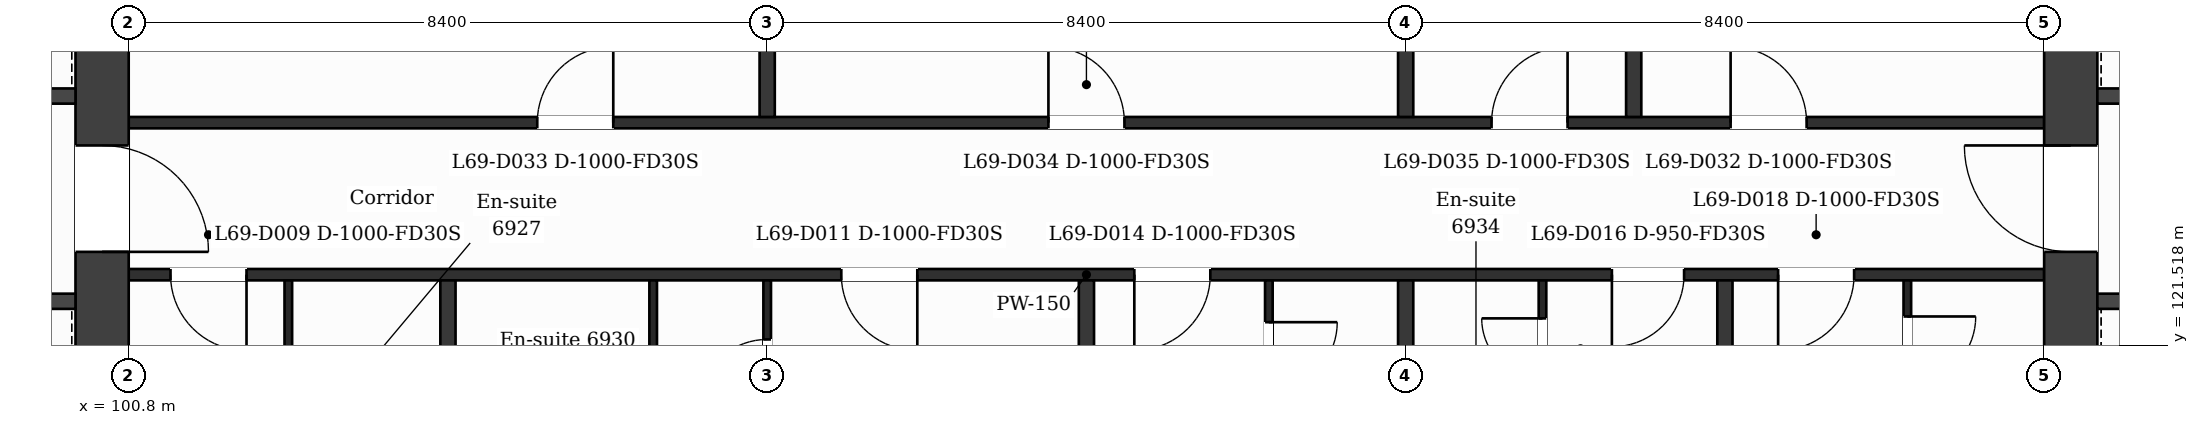
"""IFC4 building model, lengths in metres.
Left out: names, types, materials, properties, quantities, classifications, styles, units other than length and angle.
Written with IfcOpenShell. Run it as: python <this file> out.ifc"""

import sys

from ifc_helpers import new_model, si_unit, direction, frame, frame_2d, origin, place, context, subcontext, project, spatial, rectangle, extrude, element, fill, save


model = new_model("IFC4")
c1 = context("Model", 3, precision=1e-05, world=origin(), true_north=direction((0.0, 1.0)))
c2 = subcontext(c1, "Body", "Model", "MODEL_VIEW")
j1 = project(units=[si_unit("LENGTHUNIT", "METRE"), si_unit("PLANEANGLEUNIT", "RADIAN")], contexts=[c1])
p1 = place(None, origin())
s1 = spatial("IfcSite", under=j1, at=p1, CompositionType="ELEMENT")
p2 = place(p1, origin())
s2 = spatial("IfcBuilding", under=s1, at=p2, CompositionType="ELEMENT")
p3 = place(p2, frame((0.0, 0.0, 284.9)))
s3 = spatial("IfcBuildingStorey", under=s2, at=p3, CompositionType="ELEMENT", Elevation=284.9)
p4 = place(p3, frame((100.45, 132.05, 0.0), z_axis=(0.0, 0.0, 1.0), x_axis=(0.0, -1.0, 0.0)))
e1 = element("IfcWall", 1, at=p4, inside=s3, PredefinedType="SHEAR", context=c2, shape_type="SweptSolid", body=[
    extrude(rectangle(XDim=15.7, YDim=0.7, at=frame_2d((7.85, 0.0))), origin(), (0.0, 0.0, 1.0), 3.7),
])
p5 = place(p4, frame((7.9, 0.0, 0.0)))
e2 = element("IfcOpeningElement", 2, at=p5, cuts=e1, PredefinedType="OPENING", context=c2, shape_type="SweptSolid", body=[
    extrude(rectangle(XDim=1.4, YDim=2.1, at=frame_2d((0.7, 1.05))), frame((0.0, 0.36, 0.0), z_axis=(0.0, -1.0, 0.0), x_axis=(1.0, 0.0, 0.0)), (0.0, 0.0, 1.0), 0.72),
])
p6 = place(p3, frame((126.35, 116.35, 0.0), z_axis=(0.0, 0.0, 1.0), x_axis=(0.0, 1.0, 0.0)))
e3 = element("IfcWall", 3, at=p6, inside=s3, PredefinedType="SHEAR", context=c2, shape_type="SweptSolid", body=[
    extrude(rectangle(XDim=15.7, YDim=0.7, at=frame_2d((7.85, 0.0))), origin(), (0.0, 0.0, 1.0), 3.7),
])
p7 = place(p6, frame((6.4, 0.0, 0.0)))
e4 = element("IfcOpeningElement", 4, at=p7, cuts=e3, PredefinedType="OPENING", context=c2, shape_type="SweptSolid", body=[
    extrude(rectangle(XDim=1.4, YDim=2.1, at=frame_2d((0.7, 1.05))), frame((0.0, 0.36, 0.0), z_axis=(0.0, -1.0, 0.0), x_axis=(1.0, 0.0, 0.0)), (0.0, 0.0, 1.0), 0.72),
])
p8 = place(p3, frame((95.227, 122.1, 0.0), z_axis=(0.0, 0.0, 1.0), x_axis=(1.0, 0.0, 0.0)))
e5 = element("IfcWall", 5, at=p8, inside=s3, PredefinedType="PARTITIONING", context=c2, shape_type="SweptSolid", body=[
    extrude(rectangle(XDim=4.873, YDim=0.2, at=frame_2d((2.437, 0.0))), origin(), (0.0, 0.0, 1.0), 3.38),
])
p9 = place(p8, frame((0.605, 0.0, 0.0)))
e6 = element("IfcOpeningElement", 6, at=p9, cuts=e5, PredefinedType="OPENING", context=c2, shape_type="SweptSolid", body=[
    extrude(rectangle(XDim=1.1, YDim=2.1, at=frame_2d((0.55, 1.05))), frame((0.0, 0.11, 0.0), z_axis=(0.0, -1.0, 0.0), x_axis=(1.0, 0.0, 0.0)), (0.0, 0.0, 1.0), 0.22),
])
p10 = place(p8, frame((2.946, 0.0, 0.0)))
e7 = element("IfcOpeningElement", 7, at=p10, cuts=e5, PredefinedType="OPENING", context=c2, shape_type="SweptSolid", body=[
    extrude(rectangle(XDim=1.1, YDim=2.1, at=frame_2d((0.55, 1.05))), frame((0.0, 0.11, 0.0), z_axis=(0.0, -1.0, 0.0), x_axis=(1.0, 0.0, 0.0)), (0.0, 0.0, 1.0), 0.22),
])
p11 = place(p3, frame((126.7, 122.1, 0.0), z_axis=(0.0, 0.0, 1.0), x_axis=(1.0, 0.0, 0.0)))
e8 = element("IfcWall", 8, at=p11, inside=s3, PredefinedType="PARTITIONING", context=c2, shape_type="SweptSolid", body=[
    extrude(rectangle(XDim=4.873, YDim=0.2, at=frame_2d((2.437, 0.0))), origin(), (0.0, 0.0, 1.0), 3.38),
])
p12 = place(p11, frame((3.105, 0.0, 0.0)))
e9 = element("IfcOpeningElement", 9, at=p12, cuts=e8, PredefinedType="OPENING", context=c2, shape_type="SweptSolid", body=[
    extrude(rectangle(XDim=1.1, YDim=2.1, at=frame_2d((0.55, 1.05))), frame((0.0, 0.11, 0.0), z_axis=(0.0, -1.0, 0.0), x_axis=(1.0, 0.0, 0.0)), (0.0, 0.0, 1.0), 0.22),
])
p13 = place(p11, frame((0.732, 0.0, 0.0)))
e10 = element("IfcOpeningElement", 10, at=p13, cuts=e8, PredefinedType="OPENING", context=c2, shape_type="SweptSolid", body=[
    extrude(rectangle(XDim=1.1, YDim=2.1, at=frame_2d((0.55, 1.05))), frame((0.0, 0.11, 0.0), z_axis=(0.0, -1.0, 0.0), x_axis=(1.0, 0.0, 0.0)), (0.0, 0.0, 1.0), 0.22),
])
p14 = place(p3, frame((100.8, 122.45, 0.0), z_axis=(0.0, 0.0, 1.0), x_axis=(1.0, 0.0, 0.0)))
e11 = element("IfcWall", 11, at=p14, inside=s3, PredefinedType="PARTITIONING", context=c2, shape_type="SweptSolid", body=[
    extrude(rectangle(XDim=25.2, YDim=0.15, at=frame_2d((12.6, 0.0))), origin(), (0.0, 0.0, 1.0), 3.38),
])
p15 = place(p14, frame((0.55, 0.0, 0.0)))
e12 = element("IfcOpeningElement", 12, at=p15, cuts=e11, PredefinedType="OPENING", context=c2, shape_type="SweptSolid", body=[
    extrude(rectangle(XDim=1.0, YDim=2.1, at=frame_2d((0.5, 1.05))), frame((0.0, 0.085, 0.0), z_axis=(0.0, -1.0, 0.0), x_axis=(1.0, 0.0, 0.0)), (0.0, 0.0, 1.0), 0.17),
])
p16 = place(p14, frame((9.375, 0.0, 0.0)))
e13 = element("IfcOpeningElement", 13, at=p16, cuts=e11, PredefinedType="OPENING", context=c2, shape_type="SweptSolid", body=[
    extrude(rectangle(XDim=1.0, YDim=2.1, at=frame_2d((0.5, 1.05))), frame((0.0, 0.085, 0.0), z_axis=(0.0, -1.0, 0.0), x_axis=(1.0, 0.0, 0.0)), (0.0, 0.0, 1.0), 0.17),
])
p17 = place(p14, frame((13.23, 0.0, 0.0)))
e14 = element("IfcOpeningElement", 14, at=p17, cuts=e11, PredefinedType="OPENING", context=c2, shape_type="SweptSolid", body=[
    extrude(rectangle(XDim=1.0, YDim=2.1, at=frame_2d((0.5, 1.05))), frame((0.0, 0.085, 0.0), z_axis=(0.0, -1.0, 0.0), x_axis=(1.0, 0.0, 0.0)), (0.0, 0.0, 1.0), 0.17),
])
p18 = place(p14, frame((19.513, 0.0, 0.0)))
e15 = element("IfcOpeningElement", 15, at=p18, cuts=e11, PredefinedType="OPENING", context=c2, shape_type="SweptSolid", body=[
    extrude(rectangle(XDim=0.95, YDim=2.1, at=frame_2d((0.475, 1.05))), frame((0.0, 0.085, 0.0), z_axis=(0.0, -1.0, 0.0), x_axis=(1.0, 0.0, 0.0)), (0.0, 0.0, 1.0), 0.17),
])
p19 = place(p14, frame((21.7, 0.0, 0.0)))
e16 = element("IfcOpeningElement", 16, at=p19, cuts=e11, PredefinedType="OPENING", context=c2, shape_type="SweptSolid", body=[
    extrude(rectangle(XDim=1.0, YDim=2.1, at=frame_2d((0.5, 1.05))), frame((0.0, 0.085, 0.0), z_axis=(0.0, -1.0, 0.0), x_axis=(1.0, 0.0, 0.0)), (0.0, 0.0, 1.0), 0.17),
])
p20 = place(p3, frame((100.8, 124.45, 0.0), z_axis=(0.0, 0.0, 1.0), x_axis=(1.0, 0.0, 0.0)))
e17 = element("IfcWall", 17, at=p20, inside=s3, PredefinedType="PARTITIONING", context=c2, shape_type="SweptSolid", body=[
    extrude(rectangle(XDim=25.2, YDim=0.15, at=frame_2d((12.6, 0.0))), origin(), (0.0, 0.0, 1.0), 3.38),
])
p21 = place(p20, frame((21.075, 0.0, 0.0)))
e18 = element("IfcOpeningElement", 18, at=p21, cuts=e17, PredefinedType="OPENING", context=c2, shape_type="SweptSolid", body=[
    extrude(rectangle(XDim=1.0, YDim=2.1, at=frame_2d((0.5, 1.05))), frame((0.0, 0.085, 0.0), z_axis=(0.0, -1.0, 0.0), x_axis=(1.0, 0.0, 0.0)), (0.0, 0.0, 1.0), 0.17),
])
p22 = place(p20, frame((5.375, 0.0, 0.0)))
e19 = element("IfcOpeningElement", 19, at=p22, cuts=e17, PredefinedType="OPENING", context=c2, shape_type="SweptSolid", body=[
    extrude(rectangle(XDim=1.0, YDim=2.1, at=frame_2d((0.5, 1.05))), frame((0.0, 0.085, 0.0), z_axis=(0.0, -1.0, 0.0), x_axis=(1.0, 0.0, 0.0)), (0.0, 0.0, 1.0), 0.17),
])
p23 = place(p20, frame((12.1, 0.0, 0.0)))
e20 = element("IfcOpeningElement", 20, at=p23, cuts=e17, PredefinedType="OPENING", context=c2, shape_type="SweptSolid", body=[
    extrude(rectangle(XDim=1.0, YDim=2.1, at=frame_2d((0.5, 1.05))), frame((0.0, 0.085, 0.0), z_axis=(0.0, -1.0, 0.0), x_axis=(1.0, 0.0, 0.0)), (0.0, 0.0, 1.0), 0.17),
])
p24 = place(p20, frame((17.93, 0.0, 0.0)))
e21 = element("IfcOpeningElement", 21, at=p24, cuts=e17, PredefinedType="OPENING", context=c2, shape_type="SweptSolid", body=[
    extrude(rectangle(XDim=1.0, YDim=2.1, at=frame_2d((0.5, 1.05))), frame((0.0, 0.085, 0.0), z_axis=(0.0, -1.0, 0.0), x_axis=(1.0, 0.0, 0.0)), (0.0, 0.0, 1.0), 0.17),
])
p25 = place(p3, frame((92.702, 124.8, 0.0), z_axis=(0.0, 0.0, 1.0), x_axis=(1.0, 0.0, 0.0)))
e22 = element("IfcWall", 22, at=p25, inside=s3, PredefinedType="PARTITIONING", context=c2, shape_type="SweptSolid", body=[
    extrude(rectangle(XDim=7.398, YDim=0.2, at=frame_2d((3.699, 0.0))), origin(), (0.0, 0.0, 1.0), 3.38),
])
p26 = place(p25, frame((5.573, 0.0, 0.0)))
e23 = element("IfcOpeningElement", 23, at=p26, cuts=e22, PredefinedType="OPENING", context=c2, shape_type="SweptSolid", body=[
    extrude(rectangle(XDim=1.1, YDim=2.1, at=frame_2d((0.55, 1.05))), frame((0.0, 0.11, 0.0), z_axis=(0.0, -1.0, 0.0), x_axis=(1.0, 0.0, 0.0)), (0.0, 0.0, 1.0), 0.22),
])
p27 = place(p3, frame((126.7, 124.8, 0.0), z_axis=(0.0, 0.0, 1.0), x_axis=(1.0, 0.0, 0.0)))
e24 = element("IfcWall", 24, at=p27, inside=s3, PredefinedType="PARTITIONING", context=c2, shape_type="SweptSolid", body=[
    extrude(rectangle(XDim=4.849, YDim=0.2, at=frame_2d((2.424, 0.0))), origin(), (0.0, 0.0, 1.0), 3.38),
])
p28 = place(p27, frame((0.725, 0.0, 0.0)))
e25 = element("IfcOpeningElement", 25, at=p28, cuts=e24, PredefinedType="OPENING", context=c2, shape_type="SweptSolid", body=[
    extrude(rectangle(XDim=1.1, YDim=2.1, at=frame_2d((0.55, 1.05))), frame((0.0, 0.11, 0.0), z_axis=(0.0, -1.0, 0.0), x_axis=(1.0, 0.0, 0.0)), (0.0, 0.0, 1.0), 0.22),
])
p29 = place(p3, frame((102.9, 120.1, 0.0), z_axis=(0.0, 0.0, 1.0), x_axis=(0.0, 1.0, 0.0)))
e26 = element("IfcWall", 26, at=p29, inside=s3, PredefinedType="PARTITIONING", context=c2, shape_type="SweptSolid", body=[
    extrude(rectangle(XDim=2.275, YDim=0.1, at=frame_2d((1.137, 0.0))), origin(), (0.0, 0.0, 1.0), 3.38),
])
p30 = place(p29, frame((0.5, 0.0, 0.0)))
e27 = element("IfcOpeningElement", 27, at=p30, cuts=e26, PredefinedType="OPENING", context=c2, shape_type="SweptSolid", body=[
    extrude(rectangle(XDim=0.9, YDim=2.1, at=frame_2d((0.45, 1.05))), frame((0.0, 0.06, 0.0), z_axis=(0.0, -1.0, 0.0), x_axis=(1.0, 0.0, 0.0)), (0.0, 0.0, 1.0), 0.12),
])
p31 = place(p3, frame((105.0, 117.79, 0.0), z_axis=(0.0, 0.0, 1.0), x_axis=(0.0, 1.0, 0.0)))
e28 = element("IfcWall", 28, at=p31, inside=s3, PredefinedType="PARTITIONING", context=c2, shape_type="SweptSolid", body=[
    extrude(rectangle(XDim=4.585, YDim=0.2, at=frame_2d((2.292, 0.0))), origin(), (0.0, 0.0, 1.0), 3.38),
])
p32 = place(p3, frame((107.7, 120.1, 0.0), z_axis=(0.0, 0.0, 1.0), x_axis=(0.0, 1.0, 0.0)))
e29 = element("IfcWall", 29, at=p32, inside=s3, PredefinedType="PARTITIONING", context=c2, shape_type="SweptSolid", body=[
    extrude(rectangle(XDim=2.275, YDim=0.1, at=frame_2d((1.137, 0.0))), origin(), (0.0, 0.0, 1.0), 3.38),
])
p33 = place(p3, frame((109.2, 117.79, 0.0), z_axis=(0.0, 0.0, 1.0), x_axis=(0.0, 1.0, 0.0)))
e30 = element("IfcWall", 30, at=p33, inside=s3, PredefinedType="PARTITIONING", context=c2, shape_type="SweptSolid", body=[
    extrude(rectangle(XDim=4.585, YDim=0.1, at=frame_2d((2.292, 0.0))), origin(), (0.0, 0.0, 1.0), 3.38),
])
p34 = place(p33, frame((2.908, 0.0, 0.0)))
e31 = element("IfcOpeningElement", 31, at=p34, cuts=e30, PredefinedType="OPENING", context=c2, shape_type="SweptSolid", body=[
    extrude(rectangle(XDim=0.9, YDim=2.1, at=frame_2d((0.45, 1.05))), frame((0.0, 0.06, 0.0), z_axis=(0.0, -1.0, 0.0), x_axis=(1.0, 0.0, 0.0)), (0.0, 0.0, 1.0), 0.12),
])
p35 = place(p3, frame((109.2, 124.525, 0.0), z_axis=(0.0, 0.0, 1.0), x_axis=(0.0, 1.0, 0.0)))
e32 = element("IfcWall", 32, at=p35, inside=s3, PredefinedType="PARTITIONING", context=c2, shape_type="SweptSolid", body=[
    extrude(rectangle(XDim=9.2, YDim=0.2, at=frame_2d((4.6, 0.0))), origin(), (0.0, 0.0, 1.0), 3.38),
])
p36 = place(p3, frame((113.4, 117.79, 0.0), z_axis=(0.0, 0.0, 1.0), x_axis=(0.0, 1.0, 0.0)))
e33 = element("IfcWall", 33, at=p36, inside=s3, PredefinedType="PARTITIONING", context=c2, shape_type="SweptSolid", body=[
    extrude(rectangle(XDim=4.585, YDim=0.2, at=frame_2d((2.292, 0.0))), origin(), (0.0, 0.0, 1.0), 3.38),
])
p37 = place(p3, frame((115.8, 119.8, 0.0), z_axis=(0.0, 0.0, 1.0), x_axis=(0.0, 1.0, 0.0)))
e34 = element("IfcWall", 34, at=p37, inside=s3, PredefinedType="PARTITIONING", context=c2, shape_type="SweptSolid", body=[
    extrude(rectangle(XDim=2.575, YDim=0.1, at=frame_2d((1.288, 0.0))), origin(), (0.0, 0.0, 1.0), 3.38),
])
p38 = place(p37, frame((1.125, 0.0, 0.0)))
e35 = element("IfcOpeningElement", 35, at=p38, cuts=e34, PredefinedType="OPENING", context=c2, shape_type="SweptSolid", body=[
    extrude(rectangle(XDim=0.9, YDim=2.1, at=frame_2d((0.45, 1.05))), frame((0.0, 0.06, 0.0), z_axis=(0.0, -1.0, 0.0), x_axis=(1.0, 0.0, 0.0)), (0.0, 0.0, 1.0), 0.12),
])
p39 = place(p3, frame((117.6, 117.79, 0.0), z_axis=(0.0, 0.0, 1.0), x_axis=(0.0, 1.0, 0.0)))
e36 = element("IfcWall", 36, at=p39, inside=s3, PredefinedType="PARTITIONING", context=c2, shape_type="SweptSolid", body=[
    extrude(rectangle(XDim=4.585, YDim=0.2, at=frame_2d((2.292, 0.0))), origin(), (0.0, 0.0, 1.0), 3.38),
])
p40 = place(p3, frame((117.6, 124.525, 0.0), z_axis=(0.0, 0.0, 1.0), x_axis=(0.0, 1.0, 0.0)))
e37 = element("IfcWall", 37, at=p40, inside=s3, PredefinedType="PARTITIONING", context=c2, shape_type="SweptSolid", body=[
    extrude(rectangle(XDim=9.2, YDim=0.2, at=frame_2d((4.6, 0.0))), origin(), (0.0, 0.0, 1.0), 3.38),
])
p41 = place(p3, frame((119.4, 120.1, 0.0), z_axis=(0.0, 0.0, 1.0), x_axis=(0.0, 1.0, 0.0)))
e38 = element("IfcWall", 38, at=p41, inside=s3, PredefinedType="PARTITIONING", context=c2, shape_type="SweptSolid", body=[
    extrude(rectangle(XDim=2.275, YDim=0.1, at=frame_2d((1.137, 0.0))), origin(), (0.0, 0.0, 1.0), 3.38),
])
p42 = place(p41, frame((0.975, 0.0, 0.0)))
e39 = element("IfcOpeningElement", 39, at=p42, cuts=e38, PredefinedType="OPENING", context=c2, shape_type="SweptSolid", body=[
    extrude(rectangle(XDim=0.8, YDim=2.1, at=frame_2d((0.4, 1.05))), frame((0.0, 0.06, 0.0), z_axis=(0.0, -1.0, 0.0), x_axis=(1.0, 0.0, 0.0)), (0.0, 0.0, 1.0), 0.12),
])
p43 = place(p3, frame((120.6, 124.525, 0.0), z_axis=(0.0, 0.0, 1.0), x_axis=(0.0, 1.0, 0.0)))
e40 = element("IfcWall", 40, at=p43, inside=s3, PredefinedType="PARTITIONING", context=c2, shape_type="SweptSolid", body=[
    extrude(rectangle(XDim=5.825, YDim=0.2, at=frame_2d((2.913, 0.0))), origin(), (0.0, 0.0, 1.0), 3.38),
])
p44 = place(p3, frame((121.8, 117.79, 0.0), z_axis=(0.0, 0.0, 1.0), x_axis=(0.0, 1.0, 0.0)))
e41 = element("IfcWall", 41, at=p44, inside=s3, PredefinedType="PARTITIONING", context=c2, shape_type="SweptSolid", body=[
    extrude(rectangle(XDim=4.585, YDim=0.2, at=frame_2d((2.292, 0.0))), origin(), (0.0, 0.0, 1.0), 3.38),
])
p45 = place(p3, frame((124.2, 120.1, 0.0), z_axis=(0.0, 0.0, 1.0), x_axis=(0.0, 1.0, 0.0)))
e42 = element("IfcWall", 42, at=p45, inside=s3, PredefinedType="PARTITIONING", context=c2, shape_type="SweptSolid", body=[
    extrude(rectangle(XDim=2.275, YDim=0.1, at=frame_2d((1.137, 0.0))), origin(), (0.0, 0.0, 1.0), 3.38),
])
p46 = place(p45, frame((0.9, 0.0, 0.0)))
e43 = element("IfcOpeningElement", 43, at=p46, cuts=e42, PredefinedType="OPENING", context=c2, shape_type="SweptSolid", body=[
    extrude(rectangle(XDim=0.9, YDim=2.1, at=frame_2d((0.45, 1.05))), frame((0.0, 0.06, 0.0), z_axis=(0.0, -1.0, 0.0), x_axis=(1.0, 0.0, 0.0)), (0.0, 0.0, 1.0), 0.12),
])
p47 = place(p15, origin())
e44 = element("IfcDoor", 44, at=p47, inside=s3, OperationType="SINGLE_SWING_RIGHT", PredefinedType="DOOR", context=c2, shape_type="SweptSolid", body=[
    extrude(rectangle(XDim=1.0, YDim=2.1, at=frame_2d((0.5, 1.05))), frame((0.0, 0.025, 0.0), z_axis=(0.0, -1.0, 0.0), x_axis=(1.0, 0.0, 0.0)), (0.0, 0.0, 1.0), 0.05),
])
fill(e12, e44)
p48 = place(p16, origin())
e45 = element("IfcDoor", 45, at=p48, inside=s3, OperationType="SINGLE_SWING_RIGHT", PredefinedType="DOOR", context=c2, shape_type="SweptSolid", body=[
    extrude(rectangle(XDim=1.0, YDim=2.1, at=frame_2d((0.5, 1.05))), frame((0.0, 0.025, 0.0), z_axis=(0.0, -1.0, 0.0), x_axis=(1.0, 0.0, 0.0)), (0.0, 0.0, 1.0), 0.05),
])
fill(e13, e45)
p49 = place(p34, origin())
e46 = element("IfcDoor", 46, at=p49, inside=s3, OperationType="SINGLE_SWING_LEFT", PredefinedType="DOOR", context=c2, shape_type="SweptSolid", body=[
    extrude(rectangle(XDim=0.9, YDim=2.1, at=frame_2d((0.45, 1.05))), frame((0.0, 0.025, 0.0), z_axis=(0.0, -1.0, 0.0), x_axis=(1.0, 0.0, 0.0)), (0.0, 0.0, 1.0), 0.05),
])
fill(e31, e46)
p50 = place(p17, origin())
e47 = element("IfcDoor", 47, at=p50, inside=s3, OperationType="SINGLE_SWING_LEFT", PredefinedType="DOOR", context=c2, shape_type="SweptSolid", body=[
    extrude(rectangle(XDim=1.0, YDim=2.1, at=frame_2d((0.5, 1.05))), frame((0.0, 0.025, 0.0), z_axis=(0.0, -1.0, 0.0), x_axis=(1.0, 0.0, 0.0)), (0.0, 0.0, 1.0), 0.05),
])
fill(e14, e47)
p51 = place(p38, origin())
e48 = element("IfcDoor", 48, at=p51, inside=s3, OperationType="SINGLE_SWING_RIGHT", PredefinedType="DOOR", context=c2, shape_type="SweptSolid", body=[
    extrude(rectangle(XDim=0.9, YDim=2.1, at=frame_2d((0.45, 1.05))), frame((0.0, 0.025, 0.0), z_axis=(0.0, -1.0, 0.0), x_axis=(1.0, 0.0, 0.0)), (0.0, 0.0, 1.0), 0.05),
])
fill(e35, e48)
p52 = place(p18, origin())
e49 = element("IfcDoor", 49, at=p52, inside=s3, OperationType="SINGLE_SWING_LEFT", PredefinedType="DOOR", context=c2, shape_type="SweptSolid", body=[
    extrude(rectangle(XDim=0.95, YDim=2.1, at=frame_2d((0.475, 1.05))), frame((0.0, 0.025, 0.0), z_axis=(0.0, -1.0, 0.0), x_axis=(1.0, 0.0, 0.0)), (0.0, 0.0, 1.0), 0.05),
])
fill(e15, e49)
p53 = place(p42, origin())
e50 = element("IfcDoor", 50, at=p53, inside=s3, OperationType="SINGLE_SWING_RIGHT", PredefinedType="DOOR", context=c2, shape_type="SweptSolid", body=[
    extrude(rectangle(XDim=0.8, YDim=2.1, at=frame_2d((0.4, 1.05))), frame((0.0, 0.025, 0.0), z_axis=(0.0, -1.0, 0.0), x_axis=(1.0, 0.0, 0.0)), (0.0, 0.0, 1.0), 0.05),
])
fill(e39, e50)
p54 = place(p19, origin())
e51 = element("IfcDoor", 51, at=p54, inside=s3, OperationType="SINGLE_SWING_LEFT", PredefinedType="DOOR", context=c2, shape_type="SweptSolid", body=[
    extrude(rectangle(XDim=1.0, YDim=2.1, at=frame_2d((0.5, 1.05))), frame((0.0, 0.025, 0.0), z_axis=(0.0, -1.0, 0.0), x_axis=(1.0, 0.0, 0.0)), (0.0, 0.0, 1.0), 0.05),
])
fill(e16, e51)
p55 = place(p46, origin())
e52 = element("IfcDoor", 52, at=p55, inside=s3, OperationType="SINGLE_SWING_RIGHT", PredefinedType="DOOR", context=c2, shape_type="SweptSolid", body=[
    extrude(rectangle(XDim=0.9, YDim=2.1, at=frame_2d((0.45, 1.05))), frame((0.0, 0.025, 0.0), z_axis=(0.0, -1.0, 0.0), x_axis=(1.0, 0.0, 0.0)), (0.0, 0.0, 1.0), 0.05),
])
fill(e43, e52)
p56 = place(p21, origin())
e53 = element("IfcDoor", 53, at=p56, inside=s3, OperationType="SINGLE_SWING_LEFT", PredefinedType="DOOR", context=c2, shape_type="SweptSolid", body=[
    extrude(rectangle(XDim=1.0, YDim=2.1, at=frame_2d((0.5, 1.05))), frame((0.0, 0.025, 0.0), z_axis=(0.0, -1.0, 0.0), x_axis=(1.0, 0.0, 0.0)), (0.0, 0.0, 1.0), 0.05),
])
fill(e18, e53)
p57 = place(p22, origin())
e54 = element("IfcDoor", 54, at=p57, inside=s3, OperationType="SINGLE_SWING_RIGHT", PredefinedType="DOOR", context=c2, shape_type="SweptSolid", body=[
    extrude(rectangle(XDim=1.0, YDim=2.1, at=frame_2d((0.5, 1.05))), frame((0.0, 0.025, 0.0), z_axis=(0.0, -1.0, 0.0), x_axis=(1.0, 0.0, 0.0)), (0.0, 0.0, 1.0), 0.05),
])
fill(e19, e54)
p58 = place(p23, origin())
e55 = element("IfcDoor", 55, at=p58, inside=s3, OperationType="SINGLE_SWING_LEFT", PredefinedType="DOOR", context=c2, shape_type="SweptSolid", body=[
    extrude(rectangle(XDim=1.0, YDim=2.1, at=frame_2d((0.5, 1.05))), frame((0.0, 0.025, 0.0), z_axis=(0.0, -1.0, 0.0), x_axis=(1.0, 0.0, 0.0)), (0.0, 0.0, 1.0), 0.05),
])
fill(e20, e55)
p59 = place(p24, origin())
e56 = element("IfcDoor", 56, at=p59, inside=s3, OperationType="SINGLE_SWING_RIGHT", PredefinedType="DOOR", context=c2, shape_type="SweptSolid", body=[
    extrude(rectangle(XDim=1.0, YDim=2.1, at=frame_2d((0.5, 1.05))), frame((0.0, 0.025, 0.0), z_axis=(0.0, -1.0, 0.0), x_axis=(1.0, 0.0, 0.0)), (0.0, 0.0, 1.0), 0.05),
])
fill(e21, e56)
p60 = place(p5, origin())
e57 = element("IfcDoor", 57, at=p60, inside=s3, OperationType="SINGLE_SWING_RIGHT", PredefinedType="DOOR", context=c2, shape_type="SweptSolid", body=[
    extrude(rectangle(XDim=1.4, YDim=2.1, at=frame_2d((0.7, 1.05))), frame((0.0, 0.025, 0.0), z_axis=(0.0, -1.0, 0.0), x_axis=(1.0, 0.0, 0.0)), (0.0, 0.0, 1.0), 0.05),
])
fill(e2, e57)
p61 = place(p7, origin())
e58 = element("IfcDoor", 58, at=p61, inside=s3, OperationType="SINGLE_SWING_RIGHT", PredefinedType="DOOR", context=c2, shape_type="SweptSolid", body=[
    extrude(rectangle(XDim=1.4, YDim=2.1, at=frame_2d((0.7, 1.05))), frame((0.0, 0.025, 0.0), z_axis=(0.0, -1.0, 0.0), x_axis=(1.0, 0.0, 0.0)), (0.0, 0.0, 1.0), 0.05),
])
fill(e4, e58)
save(model, sys.argv[1])
